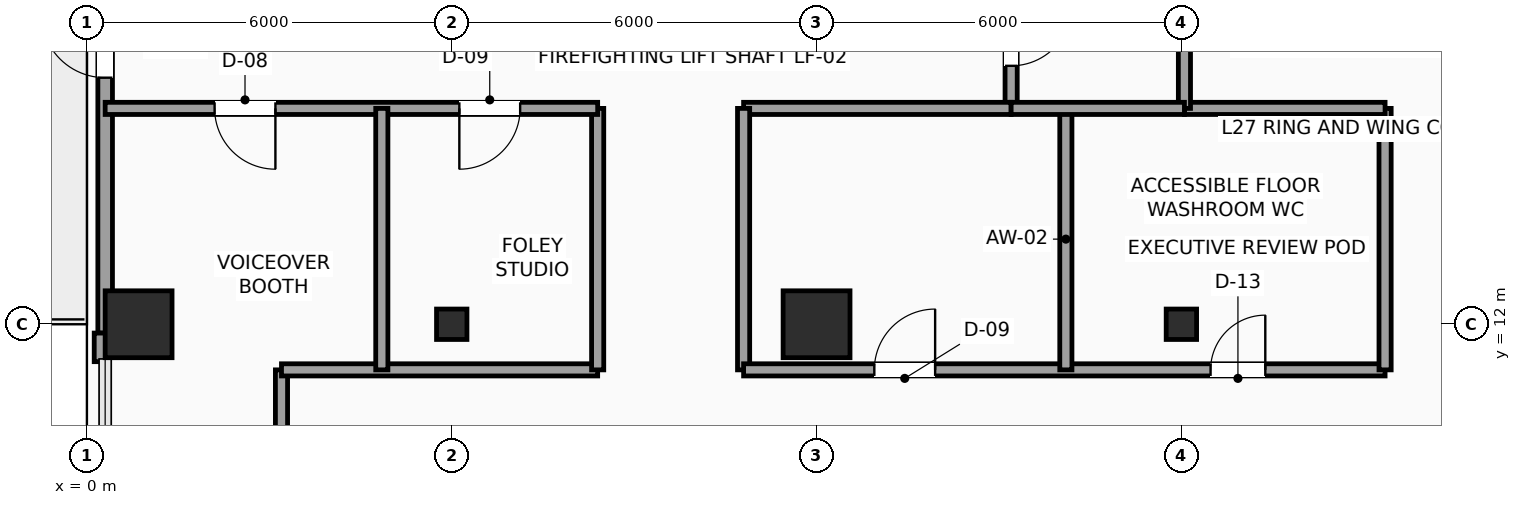
"""IFC4 building model, lengths in metres.
Left out: names, types, materials, properties, quantities, classifications, styles, units other than length and angle.
Written with IfcOpenShell. Run it as: python <this file> out.ifc"""

import sys

from ifc_helpers import new_model, si_unit, direction, frame, frame_2d, origin, origin_2d, place, context, subcontext, project, spatial, rectangle, hollow_rectangle, extrude, element, fill, save


model = new_model("IFC4")
c1 = context("Model", 3, precision=1e-05, world=origin(), true_north=direction((0.0, 1.0)))
c2 = subcontext(c1, "Body", "Model", "MODEL_VIEW")
j1 = project(units=[si_unit("LENGTHUNIT", "METRE"), si_unit("PLANEANGLEUNIT", "RADIAN")], contexts=[c1])
p1 = place(None, origin())
s1 = spatial("IfcSite", under=j1, at=p1, CompositionType="ELEMENT")
p2 = place(p1, origin())
s2 = spatial("IfcBuilding", under=s1, at=p2, CompositionType="ELEMENT")
p3 = place(p2, frame((0.0, 0.0, 115.65)))
s3 = spatial("IfcBuildingStorey", under=s2, at=p3, CompositionType="ELEMENT", Elevation=115.65)
p4 = place(p3, frame((0.85, 12.0, 0.0), z_axis=(0.0, 0.0, 1.0), x_axis=(1.0, 0.0, 0.0)))
e1 = element("IfcColumn", 1, at=p4, inside=s3, PredefinedType="COLUMN", context=c2, shape_type="SweptSolid", body=[
    extrude(rectangle(XDim=1.1, YDim=1.1, at=origin_2d()), origin(), (0.0, 0.0, 1.0), 3.75),
])
p5 = place(p3, frame((6.0, 12.0, 0.0), z_axis=(0.0, 0.0, 1.0), x_axis=(1.0, 0.0, 0.0)))
e2 = element("IfcColumn", 2, at=p5, inside=s3, PredefinedType="COLUMN", context=c2, shape_type="SweptSolid", body=[
    extrude(hollow_rectangle(XDim=0.5, YDim=0.5, WallThickness=0.025, InnerFilletRadius=0.025, OuterFilletRadius=0.04, at=origin_2d()), origin(), (0.0, 0.0, 1.0), 3.75),
])
p6 = place(p3, frame((12.0, 12.0, 0.0), z_axis=(0.0, 0.0, 1.0), x_axis=(1.0, 0.0, 0.0)))
e3 = element("IfcColumn", 3, at=p6, inside=s3, PredefinedType="COLUMN", context=c2, shape_type="SweptSolid", body=[
    extrude(rectangle(XDim=1.1, YDim=1.1, at=origin_2d()), origin(), (0.0, 0.0, 1.0), 3.75),
])
p7 = place(p3, frame((18.0, 12.0, 0.0), z_axis=(0.0, 0.0, 1.0), x_axis=(1.0, 0.0, 0.0)))
e4 = element("IfcColumn", 4, at=p7, inside=s3, PredefinedType="COLUMN", context=c2, shape_type="SweptSolid", body=[
    extrude(hollow_rectangle(XDim=0.5, YDim=0.5, WallThickness=0.025, InnerFilletRadius=0.025, OuterFilletRadius=0.04, at=origin_2d()), origin(), (0.0, 0.0, 1.0), 3.75),
])
p8 = place(p3, frame((0.3, 11.855, 0.0), z_axis=(0.0, 0.0, 1.0), x_axis=(0.0, 1.0, 0.0)))
e5 = element("IfcWall", 5, at=p8, inside=s3, PredefinedType="SOLIDWALL", context=c2, shape_type="SweptSolid", body=[
    extrude(rectangle(XDim=9.29, YDim=0.24, at=frame_2d((4.645, 0.0))), origin(), (0.0, 0.0, 1.0), 3.525),
])
p9 = place(p8, frame((4.2, 0.0, 0.0)))
e6 = element("IfcOpeningElement", 6, at=p9, cuts=e5, PredefinedType="OPENING", context=c2, shape_type="SweptSolid", body=[
    extrude(rectangle(XDim=1.05, YDim=2.2, at=frame_2d((0.525, 1.1))), frame((0.0, 0.13, 0.0), z_axis=(0.0, -1.0, 0.0), x_axis=(1.0, 0.0, 0.0)), (0.0, 0.0, 1.0), 0.26),
])
p10 = place(p8, frame((6.8, 0.0, 0.85)))
e7 = element("IfcOpeningElement", 7, at=p10, cuts=e5, PredefinedType="OPENING", context=c2, shape_type="SweptSolid", body=[
    extrude(rectangle(XDim=1.8, YDim=2.1, at=frame_2d((0.9, 1.05))), frame((0.0, 0.13, 0.0), z_axis=(0.0, -1.0, 0.0), x_axis=(1.0, 0.0, 0.0)), (0.0, 0.0, 1.0), 0.26),
])
p11 = place(p3, frame((0.24, 11.385, 0.0), z_axis=(0.0, 0.0, 1.0), x_axis=(0.0, 1.0, 0.0)))
e8 = element("IfcWall", 8, at=p11, inside=s3, PredefinedType="SOLIDWALL", context=c2, shape_type="SweptSolid", body=[
    extrude(rectangle(XDim=0.47, YDim=0.24, at=frame_2d((0.235, 0.0))), origin(), (0.0, 0.0, 1.0), 3.525),
])
p12 = place(p3, frame((3.2, 9.2, 0.0), z_axis=(0.0, 0.0, 1.0), x_axis=(0.0, 1.0, 0.0)))
e9 = element("IfcWall", 9, at=p12, inside=s3, PredefinedType="SOLIDWALL", context=c2, shape_type="SweptSolid", body=[
    extrude(rectangle(XDim=2.05, YDim=0.2, at=frame_2d((1.025, 0.0))), origin(), (0.0, 0.0, 1.0), 3.525),
])
p13 = place(p3, frame((3.2, 11.25, 0.0), z_axis=(0.0, 0.0, 1.0), x_axis=(1.0, 0.0, 0.0)))
e10 = element("IfcWall", 10, at=p13, inside=s3, PredefinedType="SOLIDWALL", context=c2, shape_type="SweptSolid", body=[
    extrude(rectangle(XDim=5.2, YDim=0.2, at=frame_2d((2.6, 0.0))), origin(), (0.0, 0.0, 1.0), 3.525),
])
p14 = place(p3, frame((8.4, 11.25, 0.0), z_axis=(0.0, 0.0, 1.0), x_axis=(0.0, 1.0, 0.0)))
e11 = element("IfcWall", 11, at=p14, inside=s3, PredefinedType="SOLIDWALL", context=c2, shape_type="SweptSolid", body=[
    extrude(rectangle(XDim=4.3, YDim=0.2, at=frame_2d((2.15, 0.0))), origin(), (0.0, 0.0, 1.0), 3.525),
])
p15 = place(p3, frame((8.4, 15.55, 0.0), z_axis=(0.0, 0.0, 1.0), x_axis=(-1.0, 0.0, 0.0)))
e12 = element("IfcWall", 12, at=p15, inside=s3, PredefinedType="SOLIDWALL", context=c2, shape_type="SweptSolid", body=[
    extrude(rectangle(XDim=8.1, YDim=0.2, at=frame_2d((4.05, 0.0))), origin(), (0.0, 0.0, 1.0), 3.525),
])
p16 = place(p15, frame((5.3, 0.0, 0.0)))
e13 = element("IfcOpeningElement", 13, at=p16, cuts=e12, PredefinedType="OPENING", context=c2, shape_type="SweptSolid", body=[
    extrude(rectangle(XDim=1.0, YDim=2.2, at=frame_2d((0.5, 1.1))), frame((0.0, 0.11, 0.0), z_axis=(0.0, -1.0, 0.0), x_axis=(1.0, 0.0, 0.0)), (0.0, 0.0, 1.0), 0.22),
])
p17 = place(p15, frame((1.275, 0.0, 0.0)))
e14 = element("IfcOpeningElement", 14, at=p17, cuts=e12, PredefinedType="OPENING", context=c2, shape_type="SweptSolid", body=[
    extrude(rectangle(XDim=1.0, YDim=2.2, at=frame_2d((0.5, 1.1))), frame((0.0, 0.11, 0.0), z_axis=(0.0, -1.0, 0.0), x_axis=(1.0, 0.0, 0.0)), (0.0, 0.0, 1.0), 0.22),
])
p18 = place(p3, frame((15.2, 17.95, 0.0), z_axis=(0.0, 0.0, 1.0), x_axis=(0.0, -1.0, 0.0)))
e15 = element("IfcWall", 15, at=p18, inside=s3, PredefinedType="SOLIDWALL", context=c2, shape_type="SweptSolid", body=[
    extrude(rectangle(XDim=2.4, YDim=0.2, at=frame_2d((1.2, 0.0))), origin(), (0.0, 0.0, 1.0), 3.525),
])
p19 = place(p18, frame((0.7, 0.0, 0.0)))
e16 = element("IfcOpeningElement", 16, at=p19, cuts=e15, PredefinedType="OPENING", context=c2, shape_type="SweptSolid", body=[
    extrude(rectangle(XDim=1.0, YDim=2.2, at=frame_2d((0.5, 1.1))), frame((0.0, 0.11, 0.0), z_axis=(0.0, -1.0, 0.0), x_axis=(1.0, 0.0, 0.0)), (0.0, 0.0, 1.0), 0.22),
])
p20 = place(p3, frame((15.2, 15.55, 0.0), z_axis=(0.0, 0.0, 1.0), x_axis=(-1.0, 0.0, 0.0)))
e17 = element("IfcWall", 17, at=p20, inside=s3, PredefinedType="SOLIDWALL", context=c2, shape_type="SweptSolid", body=[
    extrude(rectangle(XDim=4.4, YDim=0.2, at=frame_2d((2.2, 0.0))), origin(), (0.0, 0.0, 1.0), 3.525),
])
p21 = place(p3, frame((10.8, 15.55, 0.0), z_axis=(0.0, 0.0, 1.0), x_axis=(0.0, -1.0, 0.0)))
e18 = element("IfcWall", 18, at=p21, inside=s3, PredefinedType="SOLIDWALL", context=c2, shape_type="SweptSolid", body=[
    extrude(rectangle(XDim=4.3, YDim=0.2, at=frame_2d((2.15, 0.0))), origin(), (0.0, 0.0, 1.0), 3.525),
])
p22 = place(p3, frame((10.8, 11.25, 0.0), z_axis=(0.0, 0.0, 1.0), x_axis=(1.0, 0.0, 0.0)))
e19 = element("IfcWall", 19, at=p22, inside=s3, PredefinedType="SOLIDWALL", context=c2, shape_type="SweptSolid", body=[
    extrude(rectangle(XDim=10.55, YDim=0.2, at=frame_2d((5.275, 0.0))), origin(), (0.0, 0.0, 1.0), 3.525),
])
p23 = place(p22, frame((2.15, 0.0, 0.0)))
e20 = element("IfcOpeningElement", 20, at=p23, cuts=e19, PredefinedType="OPENING", context=c2, shape_type="SweptSolid", body=[
    extrude(rectangle(XDim=1.0, YDim=2.2, at=frame_2d((0.5, 1.1))), frame((0.0, 0.11, 0.0), z_axis=(0.0, -1.0, 0.0), x_axis=(1.0, 0.0, 0.0)), (0.0, 0.0, 1.0), 0.22),
])
p24 = place(p22, frame((7.68, 0.0, 0.0)))
e21 = element("IfcOpeningElement", 21, at=p24, cuts=e19, PredefinedType="OPENING", context=c2, shape_type="SweptSolid", body=[
    extrude(rectangle(XDim=0.9, YDim=2.1, at=frame_2d((0.45, 1.05))), frame((0.0, 0.11, 0.0), z_axis=(0.0, -1.0, 0.0), x_axis=(1.0, 0.0, 0.0)), (0.0, 0.0, 1.0), 0.22),
])
p25 = place(p3, frame((21.35, 11.25, 0.0), z_axis=(0.0, 0.0, 1.0), x_axis=(0.0, 1.0, 0.0)))
e22 = element("IfcWall", 22, at=p25, inside=s3, PredefinedType="SOLIDWALL", context=c2, shape_type="SweptSolid", body=[
    extrude(rectangle(XDim=4.3, YDim=0.2, at=frame_2d((2.15, 0.0))), origin(), (0.0, 0.0, 1.0), 3.525),
])
p26 = place(p3, frame((21.35, 15.55, 0.0), z_axis=(0.0, 0.0, 1.0), x_axis=(-1.0, 0.0, 0.0)))
e23 = element("IfcWall", 23, at=p26, inside=s3, PredefinedType="SOLIDWALL", context=c2, shape_type="SweptSolid", body=[
    extrude(rectangle(XDim=3.3, YDim=0.2, at=frame_2d((1.65, 0.0))), origin(), (0.0, 0.0, 1.0), 3.525),
])
p27 = place(p3, frame((18.05, 15.55, 0.0), z_axis=(0.0, 0.0, 1.0), x_axis=(0.0, 1.0, 0.0)))
e24 = element("IfcWall", 24, at=p27, inside=s3, PredefinedType="SOLIDWALL", context=c2, shape_type="SweptSolid", body=[
    extrude(rectangle(XDim=2.41, YDim=0.2, at=frame_2d((1.205, 0.0))), origin(), (0.0, 0.0, 1.0), 3.017),
])
p28 = place(p3, frame((16.1, 11.25, 0.0), z_axis=(0.0, 0.0, 1.0), x_axis=(0.0, 1.0, 0.0)))
e25 = element("IfcWall", 25, at=p28, inside=s3, PredefinedType="PARTITIONING", context=c2, shape_type="SweptSolid", body=[
    extrude(rectangle(XDim=4.3, YDim=0.2, at=frame_2d((2.15, 0.0))), origin(), (0.0, 0.0, 1.0), 3.525),
])
p29 = place(p3, frame((15.2, 15.55, 0.0), z_axis=(0.0, 0.0, 1.0), x_axis=(1.0, 0.0, 0.0)))
e26 = element("IfcWall", 26, at=p29, inside=s3, PredefinedType="PARTITIONING", context=c2, shape_type="SweptSolid", body=[
    extrude(rectangle(XDim=2.85, YDim=0.2, at=frame_2d((1.425, 0.0))), origin(), (0.0, 0.0, 1.0), 3.525),
])
p30 = place(p3, frame((4.85, 11.25, 0.0), z_axis=(0.0, 0.0, 1.0), x_axis=(0.0, 1.0, 0.0)))
e27 = element("IfcWall", 27, at=p30, inside=s3, PredefinedType="PARTITIONING", context=c2, shape_type="SweptSolid", body=[
    extrude(rectangle(XDim=4.3, YDim=0.2, at=frame_2d((2.15, 0.0))), origin(), (0.0, 0.0, 1.0), 3.525),
])
p31 = place(p9, origin())
e28 = element("IfcDoor", 28, at=p31, inside=s3, OperationType="SINGLE_SWING_RIGHT", PredefinedType="DOOR", context=c2, shape_type="SweptSolid", body=[
    extrude(rectangle(XDim=1.05, YDim=2.2, at=frame_2d((0.525, 1.1))), frame((0.0, 0.025, 0.0), z_axis=(0.0, -1.0, 0.0), x_axis=(1.0, 0.0, 0.0)), (0.0, 0.0, 1.0), 0.05),
])
fill(e6, e28)
p32 = place(p16, origin())
e29 = element("IfcDoor", 29, at=p32, inside=s3, OperationType="SINGLE_SWING_LEFT", PredefinedType="DOOR", context=c2, shape_type="SweptSolid", body=[
    extrude(rectangle(XDim=1.0, YDim=2.2, at=frame_2d((0.5, 1.1))), frame((0.0, 0.025, 0.0), z_axis=(0.0, -1.0, 0.0), x_axis=(1.0, 0.0, 0.0)), (0.0, 0.0, 1.0), 0.05),
])
fill(e13, e29)
p33 = place(p17, origin())
e30 = element("IfcDoor", 30, at=p33, inside=s3, OperationType="SINGLE_SWING_RIGHT", PredefinedType="DOOR", context=c2, shape_type="SweptSolid", body=[
    extrude(rectangle(XDim=1.0, YDim=2.2, at=frame_2d((0.5, 1.1))), frame((0.0, 0.025, 0.0), z_axis=(0.0, -1.0, 0.0), x_axis=(1.0, 0.0, 0.0)), (0.0, 0.0, 1.0), 0.05),
])
fill(e14, e30)
p34 = place(p19, origin())
e31 = element("IfcDoor", 31, at=p34, inside=s3, OperationType="SINGLE_SWING_LEFT", PredefinedType="DOOR", context=c2, shape_type="SweptSolid", body=[
    extrude(rectangle(XDim=1.0, YDim=2.2, at=frame_2d((0.5, 1.1))), frame((0.0, 0.025, 0.0), z_axis=(0.0, -1.0, 0.0), x_axis=(1.0, 0.0, 0.0)), (0.0, 0.0, 1.0), 0.05),
])
fill(e16, e31)
p35 = place(p23, origin())
e32 = element("IfcDoor", 32, at=p35, inside=s3, OperationType="SINGLE_SWING_RIGHT", PredefinedType="DOOR", context=c2, shape_type="SweptSolid", body=[
    extrude(rectangle(XDim=1.0, YDim=2.2, at=frame_2d((0.5, 1.1))), frame((0.0, 0.025, 0.0), z_axis=(0.0, -1.0, 0.0), x_axis=(1.0, 0.0, 0.0)), (0.0, 0.0, 1.0), 0.05),
])
fill(e20, e32)
p36 = place(p24, origin())
e33 = element("IfcDoor", 33, at=p36, inside=s3, OperationType="SINGLE_SWING_RIGHT", PredefinedType="DOOR", context=c2, shape_type="SweptSolid", body=[
    extrude(rectangle(XDim=0.9, YDim=2.1, at=frame_2d((0.45, 1.05))), frame((0.0, 0.025, 0.0), z_axis=(0.0, -1.0, 0.0), x_axis=(1.0, 0.0, 0.0)), (0.0, 0.0, 1.0), 0.05),
])
fill(e21, e33)
save(model, sys.argv[1])
